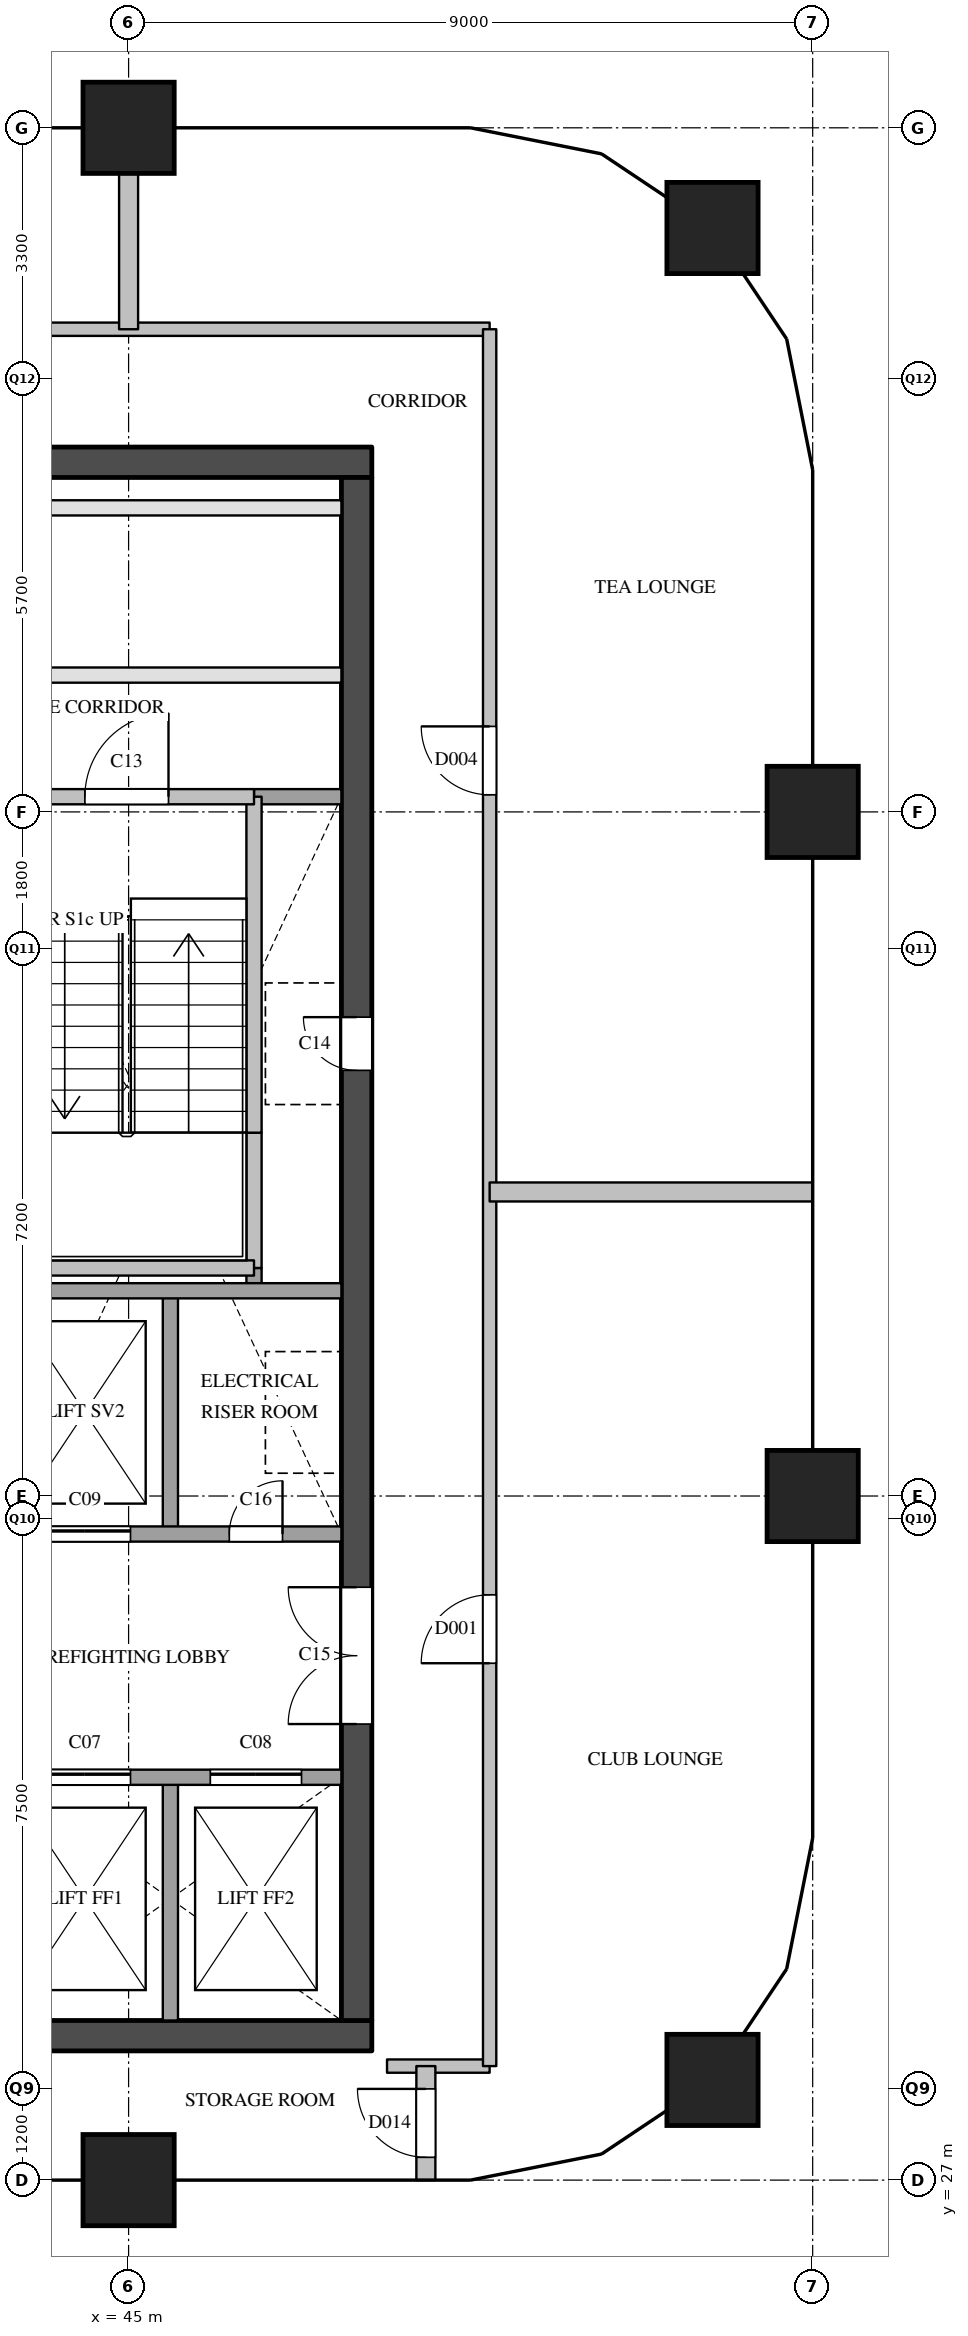
"""IFC4 building model, lengths in metres.
Left out: names, types, materials, properties, quantities, classifications, styles, units other than length and angle.
Written with IfcOpenShell. Run it as: python <this file> out.ifc"""

import sys

from ifc_helpers import new_model, si_unit, direction, frame, frame_2d, origin, origin_2d, place, context, subcontext, project, spatial, rectangle, extrude, element, fill, save


model = new_model("IFC4")
c1 = context("Model", 3, precision=1e-05, world=origin(), true_north=direction((0.0, 1.0)))
c2 = subcontext(c1, "Body", "Model", "MODEL_VIEW")
j1 = project(units=[si_unit("LENGTHUNIT", "METRE"), si_unit("PLANEANGLEUNIT", "RADIAN")], contexts=[c1])
p1 = place(None, origin())
s1 = spatial("IfcSite", under=j1, at=p1, CompositionType="ELEMENT")
p2 = place(p1, origin())
s2 = spatial("IfcBuilding", under=s1, at=p2, CompositionType="ELEMENT")
p3 = place(p2, frame((0.0, 0.0, 257.9)))
s3 = spatial("IfcBuildingStorey", under=s2, at=p3, CompositionType="ELEMENT", Elevation=257.9)
for number, where, z_axis, x_axis in (
    (1, (45.0, 27.0, 0.0), (0.0, 0.0, 1.0), (1.0, 0.0, 0.0)),
    (2, (45.0, 54.0, 0.0), (0.0, 0.0, 1.0), (1.0, 0.0, 0.0)),
    (3, (52.682, 28.318, 0.0), (0.0, 0.0, 1.0), (1.0, 0.0, 0.0)),
    (4, (54.0, 36.0, 0.0), (0.0, 0.0, 1.0), (1.0, 0.0, 0.0)),
    (5, (54.0, 45.0, 0.0), (0.0, 0.0, 1.0), (1.0, 0.0, 0.0)),
    (6, (52.682, 52.682, 0.0), (0.0, 0.0, 1.0), (1.0, 0.0, 0.0)),
):
    element("IfcColumn", number, at=place(p3, frame(where, z_axis=z_axis, x_axis=x_axis)), inside=s3, PredefinedType="COLUMN", context=c2, shape_type="SweptSolid", body=[
        extrude(rectangle(XDim=1.2, YDim=1.2, at=origin_2d()), origin(), (0.0, 0.0, 1.0), 3.9),
    ])
p4 = place(p3, frame((36.2, 28.9, 0.0), z_axis=(0.0, 0.0, 1.0), x_axis=(1.0, 0.0, 0.0)))
e7 = element("IfcWall", 7, at=p4, inside=s3, PredefinedType="SHEAR", context=c2, shape_type="SweptSolid", body=[
    extrude(rectangle(XDim=12.0, YDim=0.4, at=frame_2d((6.0, 0.0))), origin(), (0.0, 0.0, 1.0), 3.6),
])
p5 = place(p4, frame((0.85, 0.0, 0.0)))
e8 = element("IfcOpeningElement", 8, at=p5, cuts=e7, PredefinedType="OPENING", context=c2, shape_type="SweptSolid", body=[
    extrude(rectangle(XDim=1.2, YDim=2.1, at=frame_2d((0.6, 1.05))), frame((0.0, 0.21, 0.0), z_axis=(0.0, -1.0, 0.0), x_axis=(1.0, 0.0, 0.0)), (0.0, 0.0, 1.0), 0.42),
])
p6 = place(p4, frame((2.95, 0.0, 0.0)))
e9 = element("IfcOpeningElement", 9, at=p6, cuts=e7, PredefinedType="OPENING", context=c2, shape_type="SweptSolid", body=[
    extrude(rectangle(XDim=1.2, YDim=2.1, at=frame_2d((0.6, 1.05))), frame((0.0, 0.21, 0.0), z_axis=(0.0, -1.0, 0.0), x_axis=(1.0, 0.0, 0.0)), (0.0, 0.0, 1.0), 0.42),
])
p7 = place(p4, frame((5.05, 0.0, 0.0)))
e10 = element("IfcOpeningElement", 10, at=p7, cuts=e7, PredefinedType="OPENING", context=c2, shape_type="SweptSolid", body=[
    extrude(rectangle(XDim=1.2, YDim=2.1, at=frame_2d((0.6, 1.05))), frame((0.0, 0.21, 0.0), z_axis=(0.0, -1.0, 0.0), x_axis=(1.0, 0.0, 0.0)), (0.0, 0.0, 1.0), 0.42),
])
p8 = place(p3, frame((36.2, 49.6, 0.0), z_axis=(0.0, 0.0, 1.0), x_axis=(1.0, 0.0, 0.0)))
e11 = element("IfcWall", 11, at=p8, inside=s3, PredefinedType="SHEAR", context=c2, shape_type="SweptSolid", body=[
    extrude(rectangle(XDim=12.0, YDim=0.4, at=frame_2d((6.0, 0.0))), origin(), (0.0, 0.0, 1.0), 3.6),
])
p9 = place(p3, frame((48.0, 29.1, 0.0), z_axis=(0.0, 0.0, 1.0), x_axis=(0.0, 1.0, 0.0)))
e12 = element("IfcWall", 12, at=p9, inside=s3, PredefinedType="SHEAR", context=c2, shape_type="SweptSolid", body=[
    extrude(rectangle(XDim=20.3, YDim=0.4, at=frame_2d((10.15, 0.0))), origin(), (0.0, 0.0, 1.0), 3.6),
])
p10 = place(p9, frame((12.5, 0.0, 0.0)))
e13 = element("IfcOpeningElement", 13, at=p10, cuts=e12, PredefinedType="OPENING", context=c2, shape_type="SweptSolid", body=[
    extrude(rectangle(XDim=0.7, YDim=2.1, at=frame_2d((0.35, 1.05))), frame((0.0, 0.21, 0.0), z_axis=(0.0, -1.0, 0.0), x_axis=(1.0, 0.0, 0.0)), (0.0, 0.0, 1.0), 0.42),
])
p11 = place(p9, frame((3.9, 0.0, 0.0)))
e14 = element("IfcOpeningElement", 14, at=p11, cuts=e12, PredefinedType="OPENING", context=c2, shape_type="SweptSolid", body=[
    extrude(rectangle(XDim=1.8, YDim=2.1, at=frame_2d((0.9, 1.05))), frame((0.0, 0.21, 0.0), z_axis=(0.0, -1.0, 0.0), x_axis=(1.0, 0.0, 0.0)), (0.0, 0.0, 1.0), 0.42),
])
for number, where, z_axis, x_axis in (
    (15, (45.55, 29.1, 0.0), (0.0, 0.0, 1.0), (0.0, 1.0, 0.0)),
    (16, (45.55, 35.5, 0.0), (0.0, 0.0, 1.0), (0.0, 1.0, 0.0)),
):
    element("IfcWall", number, at=place(p3, frame(where, z_axis=z_axis, x_axis=x_axis)), inside=s3, PredefinedType="SOLIDWALL", context=c2, shape_type="SweptSolid", body=[
        extrude(rectangle(XDim=3.2, YDim=0.2, at=frame_2d((1.6, 0.0))), origin(), (0.0, 0.0, 1.0), 3.6),
    ])
p12 = place(p3, frame((46.65, 38.7, 0.0), z_axis=(0.0, 0.0, 1.0), x_axis=(0.0, 1.0, 0.0)))
e17 = element("IfcWall", 17, at=p12, inside=s3, PredefinedType="SOLIDWALL", context=c2, shape_type="SweptSolid", body=[
    extrude(rectangle(XDim=0.3, YDim=0.2, at=frame_2d((0.15, 0.0))), origin(), (0.0, 0.0, 1.0), 3.6),
])
p13 = place(p3, frame((46.65, 39.0, 0.0), z_axis=(0.0, 0.0, 1.0), x_axis=(0.0, 1.0, 0.0)))
e18 = element("IfcWall", 18, at=p13, inside=s3, PredefinedType="SOLIDWALL", context=c2, shape_type="SweptSolid", body=[
    extrude(rectangle(XDim=1.78, YDim=0.2, at=frame_2d((0.89, 0.0))), origin(), (0.0, 0.0, 1.0), 3.6),
])
p14 = place(p3, frame((46.65, 40.78, 0.0), z_axis=(0.0, 0.0, 1.0), x_axis=(0.0, 1.0, 0.0)))
e19 = element("IfcWall", 19, at=p14, inside=s3, PredefinedType="SOLIDWALL", context=c2, shape_type="SweptSolid", body=[
    extrude(rectangle(XDim=4.42, YDim=0.2, at=frame_2d((2.21, 0.0))), origin(), (0.0, 0.0, 1.0), 3.6),
])
p15 = place(p3, frame((36.6, 32.3, 0.0), z_axis=(0.0, 0.0, 1.0), x_axis=(1.0, 0.0, 0.0)))
e20 = element("IfcWall", 20, at=p15, inside=s3, PredefinedType="SOLIDWALL", context=c2, shape_type="SweptSolid", body=[
    extrude(rectangle(XDim=11.2, YDim=0.2, at=frame_2d((5.6, 0.0))), origin(), (0.0, 0.0, 1.0), 3.6),
])
p16 = place(p15, frame((7.225, 0.0, 0.0)))
e21 = element("IfcOpeningElement", 21, at=p16, cuts=e20, PredefinedType="OPENING", context=c2, shape_type="SweptSolid", body=[
    extrude(rectangle(XDim=1.2, YDim=2.1, at=frame_2d((0.6, 1.05))), frame((0.0, 0.11, 0.0), z_axis=(0.0, -1.0, 0.0), x_axis=(1.0, 0.0, 0.0)), (0.0, 0.0, 1.0), 0.22),
])
p17 = place(p15, frame((9.475, 0.0, 0.0)))
e22 = element("IfcOpeningElement", 22, at=p17, cuts=e20, PredefinedType="OPENING", context=c2, shape_type="SweptSolid", body=[
    extrude(rectangle(XDim=1.2, YDim=2.1, at=frame_2d((0.6, 1.05))), frame((0.0, 0.11, 0.0), z_axis=(0.0, -1.0, 0.0), x_axis=(1.0, 0.0, 0.0)), (0.0, 0.0, 1.0), 0.22),
])
p18 = place(p3, frame((43.3, 35.5, 0.0), z_axis=(0.0, 0.0, 1.0), x_axis=(1.0, 0.0, 0.0)))
e23 = element("IfcWall", 23, at=p18, inside=s3, PredefinedType="SOLIDWALL", context=c2, shape_type="SweptSolid", body=[
    extrude(rectangle(XDim=4.5, YDim=0.2, at=frame_2d((2.25, 0.0))), origin(), (0.0, 0.0, 1.0), 3.6),
])
p19 = place(p18, frame((0.525, 0.0, 0.0)))
e24 = element("IfcOpeningElement", 24, at=p19, cuts=e23, PredefinedType="OPENING", context=c2, shape_type="SweptSolid", body=[
    extrude(rectangle(XDim=1.2, YDim=2.1, at=frame_2d((0.6, 1.05))), frame((0.0, 0.11, 0.0), z_axis=(0.0, -1.0, 0.0), x_axis=(1.0, 0.0, 0.0)), (0.0, 0.0, 1.0), 0.22),
])
p20 = place(p18, frame((3.025, 0.0, 0.0)))
e25 = element("IfcOpeningElement", 25, at=p20, cuts=e23, PredefinedType="OPENING", context=c2, shape_type="SweptSolid", body=[
    extrude(rectangle(XDim=0.7, YDim=2.1, at=frame_2d((0.35, 1.05))), frame((0.0, 0.11, 0.0), z_axis=(0.0, -1.0, 0.0), x_axis=(1.0, 0.0, 0.0)), (0.0, 0.0, 1.0), 0.22),
])
p21 = place(p3, frame((43.3, 38.7, 0.0), z_axis=(0.0, 0.0, 1.0), x_axis=(1.0, 0.0, 0.0)))
e26 = element("IfcWall", 26, at=p21, inside=s3, PredefinedType="SOLIDWALL", context=c2, shape_type="SweptSolid", body=[
    extrude(rectangle(XDim=4.5, YDim=0.2, at=frame_2d((2.25, 0.0))), origin(), (0.0, 0.0, 1.0), 3.6),
])
p22 = place(p3, frame((43.4, 39.0, 0.0), z_axis=(0.0, 0.0, 1.0), x_axis=(1.0, 0.0, 0.0)))
e27 = element("IfcWall", 27, at=p22, inside=s3, PredefinedType="SOLIDWALL", context=c2, shape_type="SweptSolid", body=[
    extrude(rectangle(XDim=3.25, YDim=0.2, at=frame_2d((1.625, 0.0))), origin(), (0.0, 0.0, 1.0), 3.6),
])
p23 = place(p3, frame((46.65, 45.2, 0.0), z_axis=(0.0, 0.0, 1.0), x_axis=(1.0, 0.0, 0.0)))
e28 = element("IfcWall", 28, at=p23, inside=s3, PredefinedType="SOLIDWALL", context=c2, shape_type="SweptSolid", body=[
    extrude(rectangle(XDim=1.15, YDim=0.2, at=frame_2d((0.575, 0.0))), origin(), (0.0, 0.0, 1.0), 3.6),
])
p24 = place(p3, frame((36.6, 45.2, 0.0), z_axis=(0.0, 0.0, 1.0), x_axis=(1.0, 0.0, 0.0)))
e29 = element("IfcWall", 29, at=p24, inside=s3, PredefinedType="SOLIDWALL", context=c2, shape_type="SweptSolid", body=[
    extrude(rectangle(XDim=10.05, YDim=0.2, at=frame_2d((5.025, 0.0))), origin(), (0.0, 0.0, 1.0), 3.6),
])
p25 = place(p24, frame((1.125, 0.0, 0.0)))
e30 = element("IfcOpeningElement", 30, at=p25, cuts=e29, PredefinedType="OPENING", context=c2, shape_type="SweptSolid", body=[
    extrude(rectangle(XDim=1.1, YDim=2.1, at=frame_2d((0.55, 1.05))), frame((0.0, 0.11, 0.0), z_axis=(0.0, -1.0, 0.0), x_axis=(1.0, 0.0, 0.0)), (0.0, 0.0, 1.0), 0.22),
])
p26 = place(p24, frame((4.475, 0.0, 0.0)))
e31 = element("IfcOpeningElement", 31, at=p26, cuts=e29, PredefinedType="OPENING", context=c2, shape_type="SweptSolid", body=[
    extrude(rectangle(XDim=1.1, YDim=2.1, at=frame_2d((0.55, 1.05))), frame((0.0, 0.11, 0.0), z_axis=(0.0, -1.0, 0.0), x_axis=(1.0, 0.0, 0.0)), (0.0, 0.0, 1.0), 0.22),
])
p27 = place(p24, frame((7.825, 0.0, 0.0)))
e32 = element("IfcOpeningElement", 32, at=p27, cuts=e29, PredefinedType="OPENING", context=c2, shape_type="SweptSolid", body=[
    extrude(rectangle(XDim=1.1, YDim=2.1, at=frame_2d((0.55, 1.05))), frame((0.0, 0.11, 0.0), z_axis=(0.0, -1.0, 0.0), x_axis=(1.0, 0.0, 0.0)), (0.0, 0.0, 1.0), 0.22),
])
p28 = place(p3, frame((36.6, 46.8, 0.0), z_axis=(0.0, 0.0, 1.0), x_axis=(1.0, 0.0, 0.0)))
e33 = element("IfcWall", 33, at=p28, inside=s3, PredefinedType="PARTITIONING", context=c2, shape_type="SweptSolid", body=[
    extrude(rectangle(XDim=11.2, YDim=0.2, at=frame_2d((5.6, 0.0))), origin(), (0.0, 0.0, 1.0), 3.6),
])
p29 = place(p28, frame((5.15, 0.0, 0.0)))
e34 = element("IfcOpeningElement", 34, at=p29, cuts=e33, PredefinedType="OPENING", context=c2, shape_type="SweptSolid", body=[
    extrude(rectangle(XDim=0.9, YDim=2.1, at=frame_2d((0.45, 1.05))), frame((0.0, 0.11, 0.0), z_axis=(0.0, -1.0, 0.0), x_axis=(1.0, 0.0, 0.0)), (0.0, 0.0, 1.0), 0.22),
])
p30 = place(p3, frame((36.6, 49.0, 0.0), z_axis=(0.0, 0.0, 1.0), x_axis=(1.0, 0.0, 0.0)))
e35 = element("IfcWall", 35, at=p30, inside=s3, PredefinedType="PARTITIONING", context=c2, shape_type="SweptSolid", body=[
    extrude(rectangle(XDim=11.2, YDim=0.2, at=frame_2d((5.6, 0.0))), origin(), (0.0, 0.0, 1.0), 3.6),
])
p31 = place(p3, frame((48.4, 28.5, 0.0), z_axis=(0.0, 0.0, 1.0), x_axis=(1.0, 0.0, 0.0)))
e36 = element("IfcWall", 36, at=p31, inside=s3, PredefinedType="PARTITIONING", context=c2, shape_type="SweptSolid", body=[
    extrude(rectangle(XDim=1.35, YDim=0.175, at=frame_2d((0.675, 0.0))), origin(), (0.0, 0.0, 1.0), 3.6),
])
p32 = place(p3, frame((34.65, 51.35, 0.0), z_axis=(0.0, 0.0, 1.0), x_axis=(1.0, 0.0, 0.0)))
e37 = element("IfcWall", 37, at=p32, inside=s3, PredefinedType="PARTITIONING", context=c2, shape_type="SweptSolid", body=[
    extrude(rectangle(XDim=15.1, YDim=0.175, at=frame_2d((7.55, 0.0))), origin(), (0.0, 0.0, 1.0), 3.6),
])
p33 = place(p32, frame((2.4, 0.0, 0.0)))
e38 = element("IfcOpeningElement", 38, at=p33, cuts=e37, PredefinedType="OPENING", context=c2, shape_type="SweptSolid", body=[
    extrude(rectangle(XDim=0.9, YDim=2.1, at=frame_2d((0.45, 1.05))), frame((0.0, 0.097, 0.0), z_axis=(0.0, -1.0, 0.0), x_axis=(1.0, 0.0, 0.0)), (0.0, 0.0, 1.0), 0.195),
])
p34 = place(p32, frame((7.35, 0.0, 0.0)))
e39 = element("IfcOpeningElement", 39, at=p34, cuts=e37, PredefinedType="OPENING", context=c2, shape_type="SweptSolid", body=[
    extrude(rectangle(XDim=1.0, YDim=2.1, at=frame_2d((0.5, 1.05))), frame((0.0, 0.097, 0.0), z_axis=(0.0, -1.0, 0.0), x_axis=(1.0, 0.0, 0.0)), (0.0, 0.0, 1.0), 0.195),
])
p35 = place(p3, frame((49.75, 28.5, 0.0), z_axis=(0.0, 0.0, 1.0), x_axis=(0.0, 1.0, 0.0)))
e40 = element("IfcWall", 40, at=p35, inside=s3, PredefinedType="PARTITIONING", context=c2, shape_type="SweptSolid", body=[
    extrude(rectangle(XDim=22.85, YDim=0.175, at=frame_2d((11.425, 0.0))), origin(), (0.0, 0.0, 1.0), 3.6),
])
p36 = place(p35, frame((5.3, 0.0, 0.0)))
e41 = element("IfcOpeningElement", 41, at=p36, cuts=e40, PredefinedType="OPENING", context=c2, shape_type="SweptSolid", body=[
    extrude(rectangle(XDim=0.9, YDim=2.1, at=frame_2d((0.45, 1.05))), frame((0.0, 0.097, 0.0), z_axis=(0.0, -1.0, 0.0), x_axis=(1.0, 0.0, 0.0)), (0.0, 0.0, 1.0), 0.195),
])
p37 = place(p35, frame((16.725, 0.0, 0.0)))
e42 = element("IfcOpeningElement", 42, at=p37, cuts=e40, PredefinedType="OPENING", context=c2, shape_type="SweptSolid", body=[
    extrude(rectangle(XDim=0.9, YDim=2.1, at=frame_2d((0.45, 1.05))), frame((0.0, 0.097, 0.0), z_axis=(0.0, -1.0, 0.0), x_axis=(1.0, 0.0, 0.0)), (0.0, 0.0, 1.0), 0.195),
])
p38 = place(p3, frame((49.75, 40.0, 0.0), z_axis=(0.0, 0.0, 1.0), x_axis=(1.0, 0.0, 0.0)))
e43 = element("IfcWall", 43, at=p38, inside=s3, PredefinedType="PARTITIONING", context=c2, shape_type="SweptSolid", body=[
    extrude(rectangle(XDim=4.25, YDim=0.25, at=frame_2d((2.125, 0.0))), origin(), (0.0, 0.0, 1.0), 2.6),
])
p39 = place(p3, frame((45.0, 51.35, 0.0), z_axis=(0.0, 0.0, 1.0), x_axis=(0.0, 1.0, 0.0)))
e44 = element("IfcWall", 44, at=p39, inside=s3, PredefinedType="PARTITIONING", context=c2, shape_type="SweptSolid", body=[
    extrude(rectangle(XDim=2.65, YDim=0.25, at=frame_2d((1.325, 0.0))), origin(), (0.0, 0.0, 1.0), 3.6),
])
p40 = place(p3, frame((48.911, 27.0, 0.0), z_axis=(0.0, 0.0, 1.0), x_axis=(0.0, 1.0, 0.0)))
e45 = element("IfcWall", 45, at=p40, inside=s3, PredefinedType="PARTITIONING", context=c2, shape_type="SweptSolid", body=[
    extrude(rectangle(XDim=1.5, YDim=0.25, at=frame_2d((0.75, 0.0))), origin(), (0.0, 0.0, 1.0), 2.6),
])
p41 = place(p40, frame((0.3, 0.0, 0.0)))
e46 = element("IfcOpeningElement", 46, at=p41, cuts=e45, PredefinedType="OPENING", context=c2, shape_type="SweptSolid", body=[
    extrude(rectangle(XDim=0.9, YDim=2.1, at=frame_2d((0.45, 1.05))), frame((0.0, 0.135, 0.0), z_axis=(0.0, -1.0, 0.0), x_axis=(1.0, 0.0, 0.0)), (0.0, 0.0, 1.0), 0.27),
])
p42 = place(p16, origin())
e47 = element("IfcDoor", 47, at=p42, inside=s3, OperationType="SLIDING_TO_LEFT", PredefinedType="DOOR", context=c2, shape_type="SweptSolid", body=[
    extrude(rectangle(XDim=1.2, YDim=2.1, at=frame_2d((0.6, 1.05))), frame((0.0, 0.025, 0.0), z_axis=(0.0, -1.0, 0.0), x_axis=(1.0, 0.0, 0.0)), (0.0, 0.0, 1.0), 0.05),
])
fill(e21, e47)
p43 = place(p17, origin())
e48 = element("IfcDoor", 48, at=p43, inside=s3, OperationType="SLIDING_TO_LEFT", PredefinedType="DOOR", context=c2, shape_type="SweptSolid", body=[
    extrude(rectangle(XDim=1.2, YDim=2.1, at=frame_2d((0.6, 1.05))), frame((0.0, 0.025, 0.0), z_axis=(0.0, -1.0, 0.0), x_axis=(1.0, 0.0, 0.0)), (0.0, 0.0, 1.0), 0.05),
])
fill(e22, e48)
p44 = place(p19, origin())
e49 = element("IfcDoor", 49, at=p44, inside=s3, OperationType="SLIDING_TO_LEFT", PredefinedType="DOOR", context=c2, shape_type="SweptSolid", body=[
    extrude(rectangle(XDim=1.2, YDim=2.1, at=frame_2d((0.6, 1.05))), frame((0.0, 0.025, 0.0), z_axis=(0.0, -1.0, 0.0), x_axis=(1.0, 0.0, 0.0)), (0.0, 0.0, 1.0), 0.05),
])
fill(e24, e49)
p45 = place(p27, origin())
e50 = element("IfcDoor", 50, at=p45, inside=s3, OperationType="SINGLE_SWING_RIGHT", PredefinedType="DOOR", context=c2, shape_type="SweptSolid", body=[
    extrude(rectangle(XDim=1.1, YDim=2.1, at=frame_2d((0.55, 1.05))), frame((0.0, 0.025, 0.0), z_axis=(0.0, -1.0, 0.0), x_axis=(1.0, 0.0, 0.0)), (0.0, 0.0, 1.0), 0.05),
])
fill(e32, e50)
p46 = place(p10, origin())
e51 = element("IfcDoor", 51, at=p46, inside=s3, OperationType="SINGLE_SWING_RIGHT", PredefinedType="DOOR", context=c2, shape_type="SweptSolid", body=[
    extrude(rectangle(XDim=0.7, YDim=2.1, at=frame_2d((0.35, 1.05))), frame((0.0, 0.025, 0.0), z_axis=(0.0, -1.0, 0.0), x_axis=(1.0, 0.0, 0.0)), (0.0, 0.0, 1.0), 0.05),
])
fill(e13, e51)
p47 = place(p11, origin())
e52 = element("IfcDoor", 52, at=p47, inside=s3, OperationType="DOUBLE_DOOR_SINGLE_SWING", PredefinedType="DOOR", context=c2, shape_type="SweptSolid", body=[
    extrude(rectangle(XDim=1.8, YDim=2.1, at=frame_2d((0.9, 1.05))), frame((0.0, 0.025, 0.0), z_axis=(0.0, -1.0, 0.0), x_axis=(1.0, 0.0, 0.0)), (0.0, 0.0, 1.0), 0.05),
])
fill(e14, e52)
p48 = place(p20, origin())
e53 = element("IfcDoor", 53, at=p48, inside=s3, OperationType="SINGLE_SWING_RIGHT", PredefinedType="DOOR", context=c2, shape_type="SweptSolid", body=[
    extrude(rectangle(XDim=0.7, YDim=2.1, at=frame_2d((0.35, 1.05))), frame((0.0, 0.025, 0.0), z_axis=(0.0, -1.0, 0.0), x_axis=(1.0, 0.0, 0.0)), (0.0, 0.0, 1.0), 0.05),
])
fill(e25, e53)
p49 = place(p36, origin())
e54 = element("IfcDoor", 54, at=p49, inside=s3, OperationType="SINGLE_SWING_LEFT", PredefinedType="DOOR", context=c2, shape_type="SweptSolid", body=[
    extrude(rectangle(XDim=0.9, YDim=2.1, at=frame_2d((0.45, 1.05))), frame((0.0, 0.025, 0.0), z_axis=(0.0, -1.0, 0.0), x_axis=(1.0, 0.0, 0.0)), (0.0, 0.0, 1.0), 0.05),
])
fill(e41, e54)
p50 = place(p37, origin())
e55 = element("IfcDoor", 55, at=p50, inside=s3, OperationType="SINGLE_SWING_RIGHT", PredefinedType="DOOR", context=c2, shape_type="SweptSolid", body=[
    extrude(rectangle(XDim=0.9, YDim=2.1, at=frame_2d((0.45, 1.05))), frame((0.0, 0.025, 0.0), z_axis=(0.0, -1.0, 0.0), x_axis=(1.0, 0.0, 0.0)), (0.0, 0.0, 1.0), 0.05),
])
fill(e42, e55)
p51 = place(p41, origin())
e56 = element("IfcDoor", 56, at=p51, inside=s3, OperationType="SINGLE_SWING_RIGHT", PredefinedType="DOOR", context=c2, shape_type="SweptSolid", body=[
    extrude(rectangle(XDim=0.9, YDim=2.1, at=frame_2d((0.45, 1.05))), frame((0.0, 0.025, 0.0), z_axis=(0.0, -1.0, 0.0), x_axis=(1.0, 0.0, 0.0)), (0.0, 0.0, 1.0), 0.05),
])
fill(e46, e56)
save(model, sys.argv[1])
